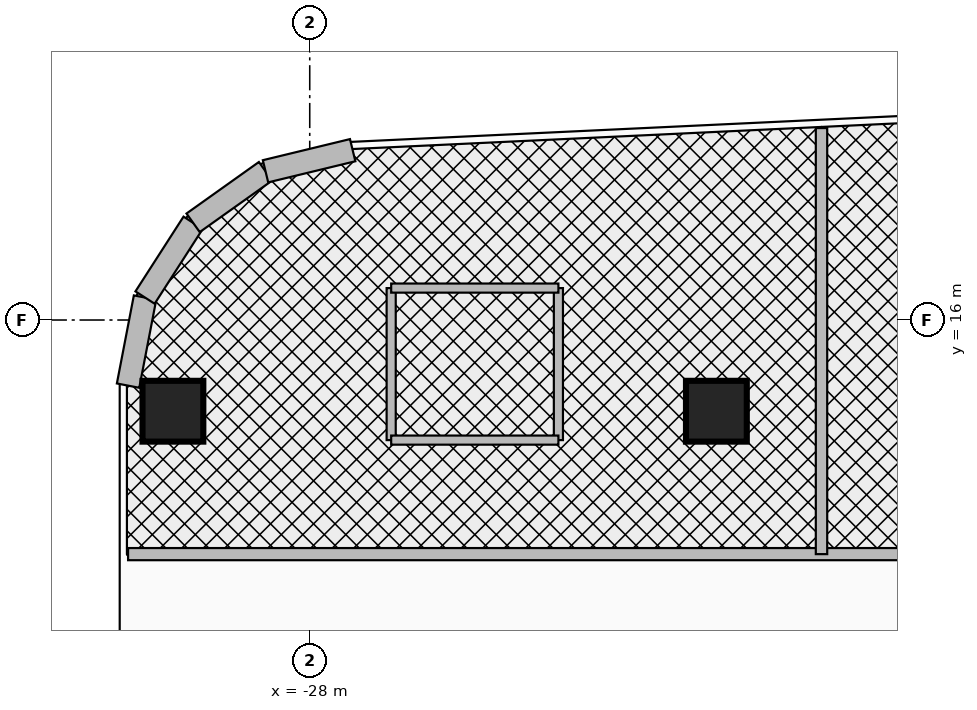
"""IFC4 building model, lengths in metres.
Left out: names, types, materials, properties, quantities, classifications, styles, units other than length and angle.
Written with IfcOpenShell. Run it as: python <this file> out.ifc"""

import sys

from ifc_helpers import new_model, si_unit, direction, frame, frame_2d, origin, origin_2d, place, context, subcontext, project, spatial, rectangle, extrude, source, transform, mapped, element, fill, save


model = new_model("IFC4")
c1 = context("Model", 3, precision=1e-05, world=origin(), true_north=direction((0.0, 1.0)))
c2 = subcontext(c1, "Body", "Model", "MODEL_VIEW")
j1 = project(units=[si_unit("LENGTHUNIT", "METRE"), si_unit("PLANEANGLEUNIT", "RADIAN")], contexts=[c1])
p1 = place(None, origin())
s1 = spatial("IfcSite", under=j1, at=p1, CompositionType="ELEMENT")
p2 = place(p1, origin())
s2 = spatial("IfcBuilding", under=s1, at=p2, CompositionType="ELEMENT")
p3 = place(p2, frame((0.0, 0.0, 240.5)))
s3 = spatial("IfcBuildingStorey", under=s2, at=p3, CompositionType="ELEMENT", Elevation=240.5)
m1 = source(origin(), c2, "Body", "SweptSolid", [
    extrude(rectangle(XDim=0.8, YDim=0.8, at=origin_2d()), origin(), (0.0, 0.0, 1.0), 3.5),
])
for number, where, z_axis, x_axis in (
    (1, (-29.8, 14.8, 0.0), (0.0, 0.0, 1.0), (1.0, 0.0, 0.0)),
    (2, (-22.65, 14.8, 0.0), (0.0, 0.0, 1.0), (1.0, 0.0, 0.0)),
):
    element("IfcColumn", number, at=place(p3, frame(where, z_axis=z_axis, x_axis=x_axis)), inside=s3, PredefinedType="COLUMN", context=c2, shape_type="MappedRepresentation", body=[
        mapped(m1, transform((0.0, 0.0, 0.0), x_axis=(1.0, 0.0, 0.0), y_axis=(0.0, 1.0, 0.0), z_axis=(0.0, 0.0, 1.0), scale=1.0)),
    ])
p4 = place(p3, frame((-30.39, 15.137, 0.0), z_axis=(0.0, 0.0, 1.0), x_axis=(0.189307792679, 0.981917796779, 0.0)))
e3 = element("IfcWall", 3, at=p4, inside=s3, PredefinedType="SOLIDWALL", context=c2, shape_type="SweptSolid", body=[
    extrude(rectangle(XDim=1.18, YDim=0.3, at=frame_2d((0.59, 0.0))), origin(), (0.0, 0.0, 1.0), 3.26),
])
p5 = place(p3, frame((-30.167, 16.295, 0.0), z_axis=(0.0, 0.0, 1.0), x_axis=(0.540842020947, 0.841124193195, 0.0)))
e4 = element("IfcWall", 4, at=p5, inside=s3, PredefinedType="SOLIDWALL", context=c2, shape_type="SweptSolid", body=[
    extrude(rectangle(XDim=1.169, YDim=0.3, at=frame_2d((0.584, 0.0))), origin(), (0.0, 0.0, 1.0), 3.26),
])
p6 = place(p3, frame((-29.534, 17.279, 0.0), z_axis=(0.0, 0.0, 1.0), x_axis=(0.81466371606, 0.579933642527, 0.0)))
e5 = element("IfcWall", 5, at=p6, inside=s3, PredefinedType="SOLIDWALL", context=c2, shape_type="SweptSolid", body=[
    extrude(rectangle(XDim=1.169, YDim=0.3, at=frame_2d((0.584, 0.0))), origin(), (0.0, 0.0, 1.0), 3.26),
])
p7 = place(p3, frame((-28.582, 17.957, 0.0), z_axis=(0.0, 0.0, 1.0), x_axis=(0.971929016595, 0.235274279725, 0.0)))
e6 = element("IfcWall", 6, at=p7, inside=s3, PredefinedType="SOLIDWALL", context=c2, shape_type="SweptSolid", body=[
    extrude(rectangle(XDim=1.18, YDim=0.3, at=frame_2d((0.59, 0.0))), origin(), (0.0, 0.0, 1.0), 3.26),
])
p8 = place(p3, frame((-30.39, 12.92, 0.0), z_axis=(0.0, 0.0, 1.0), x_axis=(1.0, 0.0, 0.0)))
e7 = element("IfcWall", 7, at=p8, inside=s3, PredefinedType="PARTITIONING", context=c2, shape_type="SweptSolid", body=[
    extrude(rectangle(XDim=29.48, YDim=0.16, at=frame_2d((14.74, 0.0))), origin(), (0.0, 0.0, 1.0), 2.634),
])
p9 = place(p8, frame((4.087, 0.0, 0.0)))
e8 = element("IfcOpeningElement", 8, at=p9, cuts=e7, PredefinedType="OPENING", context=c2, shape_type="SweptSolid", body=[
    extrude(rectangle(XDim=0.95, YDim=2.15, at=frame_2d((0.475, 1.075))), frame((0.0, 0.095, 0.0), z_axis=(0.0, -1.0, 0.0), x_axis=(1.0, 0.0, 0.0)), (0.0, 0.0, 1.0), 0.19),
])
p10 = place(p8, frame((13.765, 0.0, 0.0)))
e9 = element("IfcOpeningElement", 9, at=p10, cuts=e7, PredefinedType="OPENING", context=c2, shape_type="SweptSolid", body=[
    extrude(rectangle(XDim=0.95, YDim=2.15, at=frame_2d((0.475, 1.075))), frame((0.0, 0.095, 0.0), z_axis=(0.0, -1.0, 0.0), x_axis=(1.0, 0.0, 0.0)), (0.0, 0.0, 1.0), 0.19),
])
p11 = place(p8, frame((22.843, 0.0, 0.0)))
e10 = element("IfcOpeningElement", 10, at=p11, cuts=e7, PredefinedType="OPENING", context=c2, shape_type="SweptSolid", body=[
    extrude(rectangle(XDim=0.95, YDim=2.15, at=frame_2d((0.475, 1.075))), frame((0.0, 0.095, 0.0), z_axis=(0.0, -1.0, 0.0), x_axis=(1.0, 0.0, 0.0)), (0.0, 0.0, 1.0), 0.19),
])
p12 = place(p3, frame((-21.267, 12.92, 0.0), z_axis=(0.0, 0.0, 1.0), x_axis=(0.0, 1.0, 0.0)))
e11 = element("IfcWall", 11, at=p12, inside=s3, PredefinedType="PARTITIONING", context=c2, shape_type="SweptSolid", body=[
    extrude(rectangle(XDim=5.605, YDim=0.15, at=frame_2d((2.803, 0.0))), origin(), (0.0, 0.0, 1.0), 2.544),
])
for number, where, z_axis, x_axis in (
    (12, (-26.928, 14.42, 0.0), (0.0, 0.0, 1.0), (0.0, 1.0, 0.0)),
    (13, (-24.729, 14.42, 0.0), (0.0, 0.0, 1.0), (0.0, 1.0, 0.0)),
):
    element("IfcWall", number, at=place(p3, frame(where, z_axis=z_axis, x_axis=x_axis)), inside=s3, PredefinedType="PARTITIONING", context=c2, shape_type="SweptSolid", body=[
        extrude(rectangle(XDim=2.0, YDim=0.12, at=frame_2d((1.0, 0.0))), origin(), (0.0, 0.0, 1.0), 2.544),
    ])
p13 = place(p3, frame((-26.928, 16.42, 0.0), z_axis=(0.0, 0.0, 1.0), x_axis=(1.0, 0.0, 0.0)))
e14 = element("IfcWall", 14, at=p13, inside=s3, PredefinedType="PARTITIONING", context=c2, shape_type="SweptSolid", body=[
    extrude(rectangle(XDim=2.2, YDim=0.12, at=frame_2d((1.1, 0.0))), origin(), (0.0, 0.0, 1.0), 3.26),
])
p14 = place(p3, frame((-26.928, 14.42, 0.0), z_axis=(0.0, 0.0, 1.0), x_axis=(1.0, 0.0, 0.0)))
e15 = element("IfcWall", 15, at=p14, inside=s3, PredefinedType="PARTITIONING", context=c2, shape_type="SweptSolid", body=[
    extrude(rectangle(XDim=2.2, YDim=0.12, at=frame_2d((1.1, 0.0))), origin(), (0.0, 0.0, 1.0), 3.26),
])
p15 = place(p14, frame((0.675, 0.0, 0.0)))
e16 = element("IfcOpeningElement", 16, at=p15, cuts=e15, PredefinedType="OPENING", context=c2, shape_type="SweptSolid", body=[
    extrude(rectangle(XDim=0.85, YDim=2.1, at=frame_2d((0.425, 1.05))), frame((0.0, 0.075, 0.0), z_axis=(0.0, -1.0, 0.0), x_axis=(1.0, 0.0, 0.0)), (0.0, 0.0, 1.0), 0.15),
])
p16 = place(p9, frame((0.95, 0.0, 0.0), z_axis=(0.0, 0.0, 1.0), x_axis=(-1.0, 0.0, 0.0)))
e17 = element("IfcDoor", 17, at=p16, inside=s3, OperationType="SINGLE_SWING_LEFT", PredefinedType="DOOR", context=c2, shape_type="SweptSolid", body=[
    extrude(rectangle(XDim=0.95, YDim=2.15, at=frame_2d((0.475, 1.075))), frame((0.0, 0.025, 0.0), z_axis=(0.0, -1.0, 0.0), x_axis=(1.0, 0.0, 0.0)), (0.0, 0.0, 1.0), 0.05),
])
fill(e8, e17)
p17 = place(p15, origin())
e18 = element("IfcDoor", 18, at=p17, inside=s3, OperationType="SINGLE_SWING_RIGHT", PredefinedType="DOOR", context=c2, shape_type="SweptSolid", body=[
    extrude(rectangle(XDim=0.85, YDim=2.1, at=frame_2d((0.425, 1.05))), frame((0.0, 0.025, 0.0), z_axis=(0.0, -1.0, 0.0), x_axis=(1.0, 0.0, 0.0)), (0.0, 0.0, 1.0), 0.05),
])
fill(e16, e18)
save(model, sys.argv[1])
